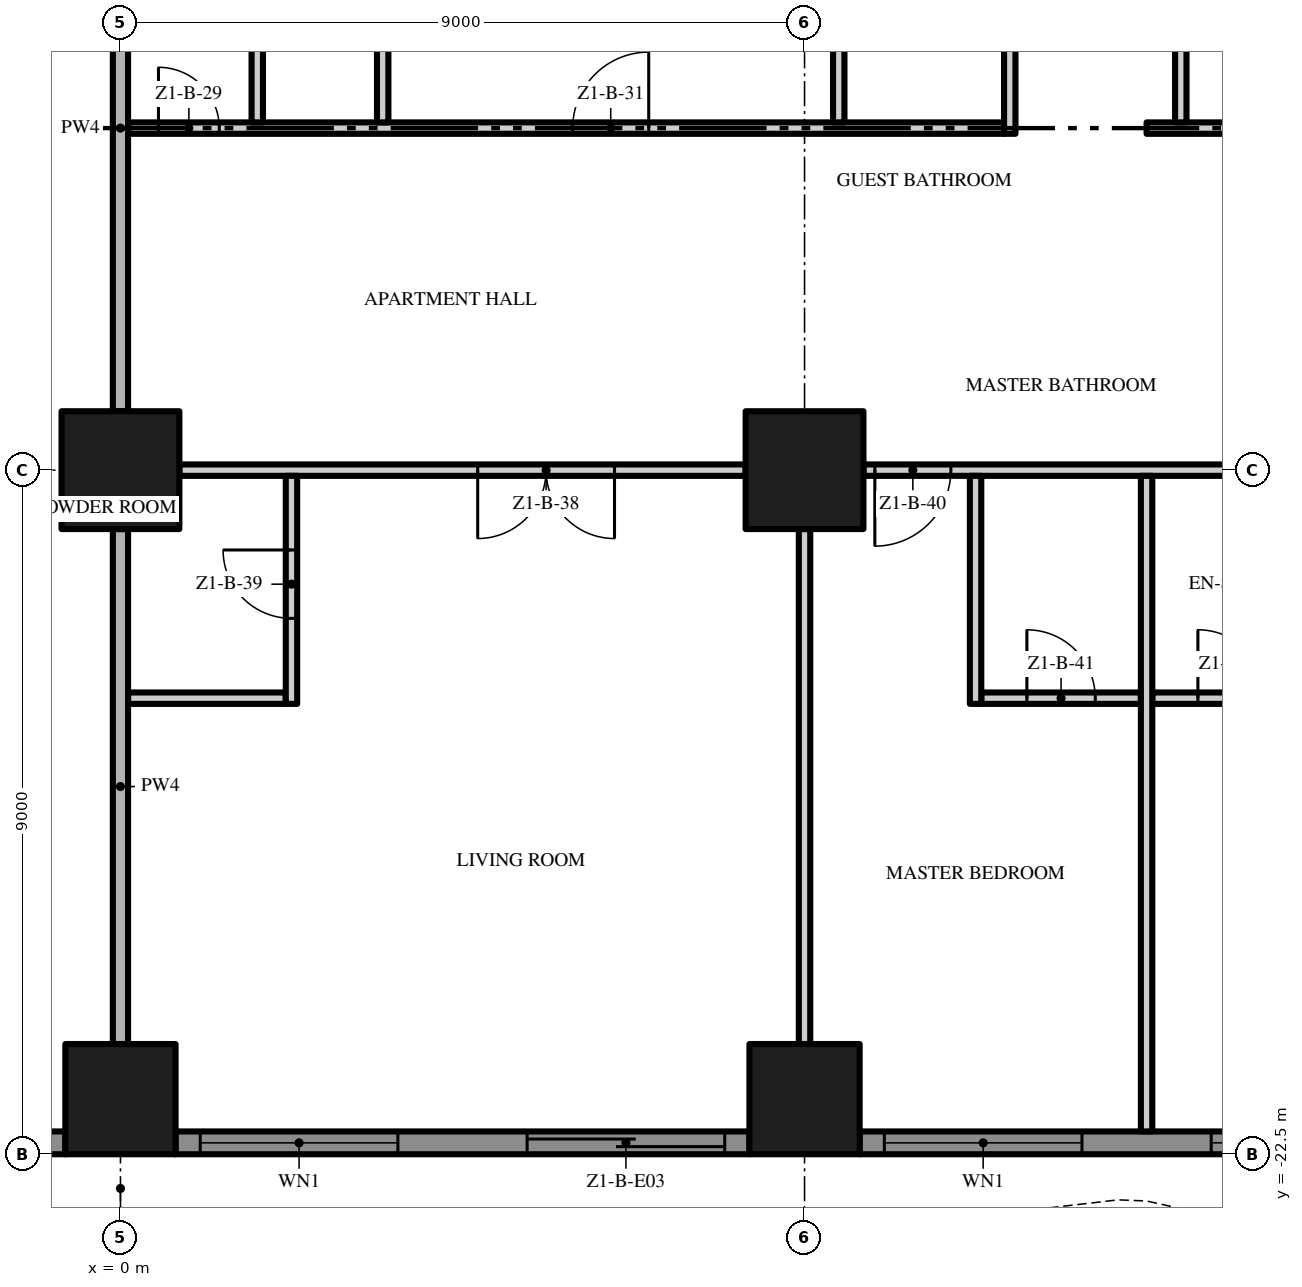
"""IFC4 building model, lengths in metres.
Left out: names, types, materials, properties, quantities, classifications, styles, units other than length and angle.
Written with IfcOpenShell. Run it as: python <this file> out.ifc"""

import sys

from ifc_helpers import new_model, si_unit, direction, frame, frame_2d, origin, origin_2d, place, context, subcontext, project, spatial, polyline, rectangle, outline, extrude, element, fill, save


model = new_model("IFC4")
c1 = context("Model", 3, precision=1e-05, world=origin(), true_north=direction((0.0, 1.0)))
c2 = subcontext(c1, "Body", "Model", "MODEL_VIEW")
j1 = project(units=[si_unit("LENGTHUNIT", "METRE"), si_unit("PLANEANGLEUNIT", "RADIAN")], contexts=[c1])
p1 = place(None, origin())
s1 = spatial("IfcSite", under=j1, at=p1, CompositionType="ELEMENT")
p2 = place(p1, origin())
s2 = spatial("IfcBuilding", under=s1, at=p2, CompositionType="ELEMENT")
p3 = place(p2, frame((0.0, 0.0, 26.4)))
s3 = spatial("IfcBuildingStorey", under=s2, at=p3, CompositionType="ELEMENT", Elevation=26.4)
p4 = place(p3, frame((0.0, -13.5, 0.0), z_axis=(0.0, 0.0, 1.0), x_axis=(1.0, 0.0, 0.0)))
e1 = element("IfcColumn", 1, at=p4, inside=s3, PredefinedType="COLUMN", context=c2, shape_type="SweptSolid", body=[
    extrude(rectangle(XDim=1.55, YDim=1.55, at=origin_2d()), origin(), (0.0, 0.0, 1.0), 3.5),
])
p5 = place(p3, frame((0.0, -21.775, 0.0), z_axis=(0.0, 0.0, 1.0), x_axis=(1.0, 0.0, 0.0)))
e2 = element("IfcColumn", 2, at=p5, inside=s3, PredefinedType="COLUMN", context=c2, shape_type="SweptSolid", body=[
    extrude(rectangle(XDim=1.45, YDim=1.45, at=origin_2d()), origin(), (0.0, 0.0, 1.0), 3.5),
])
p6 = place(p3, frame((9.0, -13.5, 0.0), z_axis=(0.0, 0.0, 1.0), x_axis=(1.0, 0.0, 0.0)))
e3 = element("IfcColumn", 3, at=p6, inside=s3, PredefinedType="COLUMN", context=c2, shape_type="SweptSolid", body=[
    extrude(rectangle(XDim=1.55, YDim=1.55, at=origin_2d()), origin(), (0.0, 0.0, 1.0), 3.5),
])
p7 = place(p3, frame((9.0, -21.775, 0.0), z_axis=(0.0, 0.0, 1.0), x_axis=(1.0, 0.0, 0.0)))
e4 = element("IfcColumn", 4, at=p7, inside=s3, PredefinedType="COLUMN", context=c2, shape_type="SweptSolid", body=[
    extrude(rectangle(XDim=1.45, YDim=1.45, at=origin_2d()), origin(), (0.0, 0.0, 1.0), 3.5),
])
p8 = place(p3, frame((-0.725, -22.35, 0.0), z_axis=(0.0, 0.0, 1.0), x_axis=(-1.0, 0.0, 0.0)))
e5 = element("IfcWall", 5, at=p8, inside=s3, PredefinedType="SOLIDWALL", context=c2, shape_type="SweptSolid", body=[
    extrude(rectangle(XDim=7.55, YDim=0.3, at=frame_2d((3.775, 0.0))), origin(), (0.0, 0.0, 1.0), 3.5),
])
p9 = place(p8, frame((4.625, 0.0, 0.0)))
e6 = element("IfcOpeningElement", 6, at=p9, cuts=e5, PredefinedType="OPENING", context=c2, shape_type="SweptSolid", body=[
    extrude(rectangle(XDim=2.6, YDim=2.4, at=frame_2d((1.3, 1.2))), frame((0.0, 0.16, 0.0), z_axis=(0.0, -1.0, 0.0), x_axis=(1.0, 0.0, 0.0)), (0.0, 0.0, 1.0), 0.32),
])
p10 = place(p8, frame((0.325, 0.0, 0.45)))
e7 = element("IfcOpeningElement", 7, at=p10, cuts=e5, PredefinedType="OPENING", context=c2, shape_type="SweptSolid", body=[
    extrude(rectangle(XDim=2.6, YDim=2.65, at=frame_2d((1.3, 1.325))), frame((0.0, 0.16, 0.0), z_axis=(0.0, -1.0, 0.0), x_axis=(1.0, 0.0, 0.0)), (0.0, 0.0, 1.0), 0.32),
])
p11 = place(p3, frame((8.275, -22.35, 0.0), z_axis=(0.0, 0.0, 1.0), x_axis=(-1.0, 0.0, 0.0)))
e8 = element("IfcWall", 8, at=p11, inside=s3, PredefinedType="SOLIDWALL", context=c2, shape_type="SweptSolid", body=[
    extrude(rectangle(XDim=7.55, YDim=0.3, at=frame_2d((3.775, 0.0))), origin(), (0.0, 0.0, 1.0), 3.5),
])
p12 = place(p11, frame((4.625, 0.0, 0.45)))
e9 = element("IfcOpeningElement", 9, at=p12, cuts=e8, PredefinedType="OPENING", context=c2, shape_type="SweptSolid", body=[
    extrude(rectangle(XDim=2.6, YDim=2.65, at=frame_2d((1.3, 1.325))), frame((0.0, 0.16, 0.0), z_axis=(0.0, -1.0, 0.0), x_axis=(1.0, 0.0, 0.0)), (0.0, 0.0, 1.0), 0.32),
])
p13 = place(p11, frame((0.325, 0.0, 0.0)))
e10 = element("IfcOpeningElement", 10, at=p13, cuts=e8, PredefinedType="OPENING", context=c2, shape_type="SweptSolid", body=[
    extrude(rectangle(XDim=2.6, YDim=2.4, at=frame_2d((1.3, 1.2))), frame((0.0, 0.16, 0.0), z_axis=(0.0, -1.0, 0.0), x_axis=(1.0, 0.0, 0.0)), (0.0, 0.0, 1.0), 0.32),
])
p14 = place(p3, frame((17.275, -22.35, 0.0), z_axis=(0.0, 0.0, 1.0), x_axis=(-1.0, 0.0, 0.0)))
e11 = element("IfcWall", 11, at=p14, inside=s3, PredefinedType="SOLIDWALL", context=c2, shape_type="SweptSolid", body=[
    extrude(rectangle(XDim=7.55, YDim=0.3, at=frame_2d((3.775, 0.0))), origin(), (0.0, 0.0, 1.0), 3.5),
])
p15 = place(p14, frame((4.625, 0.0, 0.45)))
e12 = element("IfcOpeningElement", 12, at=p15, cuts=e11, PredefinedType="OPENING", context=c2, shape_type="SweptSolid", body=[
    extrude(rectangle(XDim=2.6, YDim=2.65, at=frame_2d((1.3, 1.325))), frame((0.0, 0.16, 0.0), z_axis=(0.0, -1.0, 0.0), x_axis=(1.0, 0.0, 0.0)), (0.0, 0.0, 1.0), 0.32),
])
p16 = place(p14, frame((0.325, 0.0, 0.45)))
e13 = element("IfcOpeningElement", 13, at=p16, cuts=e11, PredefinedType="OPENING", context=c2, shape_type="SweptSolid", body=[
    extrude(rectangle(XDim=2.6, YDim=2.65, at=frame_2d((1.3, 1.325))), frame((0.0, 0.16, 0.0), z_axis=(0.0, -1.0, 0.0), x_axis=(1.0, 0.0, 0.0)), (0.0, 0.0, 1.0), 0.32),
])
p17 = place(p3, origin())
e14 = element("IfcWall", 14, at=p17, inside=s3, PredefinedType="USERDEFINED", context=c2, shape_type="SweptSolid", body=[
    extrude(outline(polyline([(-22.5, -25.149), (-21.0, -24.488), (-19.5, -23.755), (-18.0, -23.231), (-16.875, -23.1), (-16.5, -23.115), (-15.0, -23.451), (-13.5, -24.112), (-12.0, -24.845), (-10.5, -25.369), (-9.375, -25.5), (-9.0, -25.485), (-7.5, -25.149), (-6.0, -24.488), (-4.5, -23.755), (-3.0, -23.231), (-1.875, -23.1), (-1.5, -23.115), (0.0, -23.451), (1.5, -24.112), (3.0, -24.845), (4.5, -25.369), (5.625, -25.5), (6.0, -25.485), (7.5, -25.149), (9.0, -24.488), (10.5, -23.755), (12.0, -23.231), (13.125, -23.1), (13.5, -23.115), (15.0, -23.451), (16.5, -24.112), (18.0, -24.845), (19.5, -25.369), (20.625, -25.5), (21.0, -25.485), (22.5, -25.149), (22.445, -24.905), (20.967, -25.236), (20.635, -25.249), (19.556, -25.124), (18.096, -24.614), (16.605, -23.885), (15.079, -23.213), (13.533, -22.866), (13.115, -22.849), (11.944, -22.986), (10.404, -23.524), (8.895, -24.261), (7.421, -24.91), (5.967, -25.236), (5.635, -25.249), (4.556, -25.124), (3.096, -24.614), (1.605, -23.885), (0.079, -23.213), (-1.467, -22.866), (-1.885, -22.849), (-3.056, -22.986), (-4.596, -23.524), (-6.105, -24.261), (-7.579, -24.91), (-9.033, -25.236), (-9.365, -25.249), (-10.444, -25.124), (-11.904, -24.614), (-13.395, -23.885), (-14.921, -23.213), (-16.467, -22.866), (-16.885, -22.849), (-18.056, -22.986), (-19.596, -23.524), (-21.105, -24.261), (-22.601, -24.92), (-22.5, -25.149)])), origin(), (0.0, 0.0, 1.0), 0.9),
])
p18 = place(p3, frame((0.1, -16.5, 0.0), z_axis=(0.0, 0.0, 1.0), x_axis=(1.0, 0.0, 0.0)))
e15 = element("IfcWall", 15, at=p18, inside=s3, PredefinedType="PARTITIONING", context=c2, shape_type="SweptSolid", body=[
    extrude(rectangle(XDim=2.075, YDim=0.15, at=frame_2d((1.038, 0.0))), origin(), (0.0, 0.0, 1.0), 3.5),
])
p19 = place(p3, frame((11.325, -16.5, 0.0), z_axis=(0.0, 0.0, 1.0), x_axis=(1.0, 0.0, 0.0)))
e16 = element("IfcWall", 16, at=p19, inside=s3, PredefinedType="PARTITIONING", context=c2, shape_type="SweptSolid", body=[
    extrude(rectangle(XDim=2.1, YDim=0.15, at=frame_2d((1.05, 0.0))), origin(), (0.0, 0.0, 1.0), 3.5),
])
p20 = place(p19, frame((0.6, 0.0, 0.0)))
e17 = element("IfcOpeningElement", 17, at=p20, cuts=e16, PredefinedType="OPENING", context=c2, shape_type="SweptSolid", body=[
    extrude(rectangle(XDim=0.9, YDim=2.1, at=frame_2d((0.45, 1.05))), frame((0.0, 0.085, 0.0), z_axis=(0.0, -1.0, 0.0), x_axis=(1.0, 0.0, 0.0)), (0.0, 0.0, 1.0), 0.17),
])
p21 = place(p3, frame((13.575, -16.5, 0.0), z_axis=(0.0, 0.0, 1.0), x_axis=(1.0, 0.0, 0.0)))
e18 = element("IfcWall", 18, at=p21, inside=s3, PredefinedType="PARTITIONING", context=c2, shape_type="SweptSolid", body=[
    extrude(rectangle(XDim=2.1, YDim=0.15, at=frame_2d((1.05, 0.0))), origin(), (0.0, 0.0, 1.0), 3.5),
])
p22 = place(p21, frame((0.6, 0.0, 0.0)))
e19 = element("IfcOpeningElement", 19, at=p22, cuts=e18, PredefinedType="OPENING", context=c2, shape_type="SweptSolid", body=[
    extrude(rectangle(XDim=0.9, YDim=2.1, at=frame_2d((0.45, 1.05))), frame((0.0, 0.085, 0.0), z_axis=(0.0, -1.0, 0.0), x_axis=(1.0, 0.0, 0.0)), (0.0, 0.0, 1.0), 0.17),
])
p23 = place(p3, frame((8.225, -13.5, 0.0), z_axis=(0.0, 0.0, 1.0), x_axis=(-1.0, 0.0, 0.0)))
e20 = element("IfcWall", 20, at=p23, inside=s3, PredefinedType="PARTITIONING", context=c2, shape_type="SweptSolid", body=[
    extrude(rectangle(XDim=7.45, YDim=0.15, at=frame_2d((3.725, 0.0))), origin(), (0.0, 0.0, 1.0), 3.5),
])
p24 = place(p23, frame((1.725, 0.0, 0.0)))
e21 = element("IfcOpeningElement", 21, at=p24, cuts=e20, PredefinedType="OPENING", context=c2, shape_type="SweptSolid", body=[
    extrude(rectangle(XDim=1.8, YDim=2.4, at=frame_2d((0.9, 1.2))), frame((0.0, 0.085, 0.0), z_axis=(0.0, -1.0, 0.0), x_axis=(1.0, 0.0, 0.0)), (0.0, 0.0, 1.0), 0.17),
])
p25 = place(p3, frame((17.225, -13.5, 0.0), z_axis=(0.0, 0.0, 1.0), x_axis=(-1.0, 0.0, 0.0)))
e22 = element("IfcWall", 22, at=p25, inside=s3, PredefinedType="PARTITIONING", context=c2, shape_type="SweptSolid", body=[
    extrude(rectangle(XDim=7.45, YDim=0.15, at=frame_2d((3.725, 0.0))), origin(), (0.0, 0.0, 1.0), 3.5),
])
p26 = place(p25, frame((6.3, 0.0, 0.0)))
e23 = element("IfcOpeningElement", 23, at=p26, cuts=e22, PredefinedType="OPENING", context=c2, shape_type="SweptSolid", body=[
    extrude(rectangle(XDim=1.0, YDim=2.4, at=frame_2d((0.5, 1.2))), frame((0.0, 0.085, 0.0), z_axis=(0.0, -1.0, 0.0), x_axis=(1.0, 0.0, 0.0)), (0.0, 0.0, 1.0), 0.17),
])
p27 = place(p25, frame((0.15, 0.0, 0.0)))
e24 = element("IfcOpeningElement", 24, at=p27, cuts=e22, PredefinedType="OPENING", context=c2, shape_type="SweptSolid", body=[
    extrude(rectangle(XDim=1.0, YDim=2.4, at=frame_2d((0.5, 1.2))), frame((0.0, 0.085, 0.0), z_axis=(0.0, -1.0, 0.0), x_axis=(1.0, 0.0, 0.0)), (0.0, 0.0, 1.0), 0.17),
])
p28 = place(p3, frame((0.1, -9.0, 0.0), z_axis=(0.0, 0.0, 1.0), x_axis=(1.0, 0.0, 0.0)))
e25 = element("IfcWall", 25, at=p28, inside=s3, PredefinedType="PARTITIONING", context=c2, shape_type="SweptSolid", body=[
    extrude(rectangle(XDim=11.525, YDim=0.15, at=frame_2d((5.763, 0.0))), origin(), (0.0, 0.0, 1.0), 3.5),
])
p29 = place(p28, frame((0.4, 0.0, 0.0)))
e26 = element("IfcOpeningElement", 26, at=p29, cuts=e25, PredefinedType="OPENING", context=c2, shape_type="SweptSolid", body=[
    extrude(rectangle(XDim=0.8, YDim=2.0, at=frame_2d((0.4, 1.0))), frame((0.0, 0.085, 0.0), z_axis=(0.0, -1.0, 0.0), x_axis=(1.0, 0.0, 0.0)), (0.0, 0.0, 1.0), 0.17),
])
p30 = place(p28, frame((5.85, 0.0, 0.0)))
e27 = element("IfcOpeningElement", 27, at=p30, cuts=e25, PredefinedType="OPENING", context=c2, shape_type="SweptSolid", body=[
    extrude(rectangle(XDim=1.0, YDim=2.4, at=frame_2d((0.5, 1.2))), frame((0.0, 0.085, 0.0), z_axis=(0.0, -1.0, 0.0), x_axis=(1.0, 0.0, 0.0)), (0.0, 0.0, 1.0), 0.17),
])
p31 = place(p3, frame((13.5, -9.0, 0.0), z_axis=(0.0, 0.0, 1.0), x_axis=(1.0, 0.0, 0.0)))
e28 = element("IfcWall", 28, at=p31, inside=s3, PredefinedType="PARTITIONING", context=c2, shape_type="SweptSolid", body=[
    extrude(rectangle(XDim=13.2, YDim=0.15, at=frame_2d((6.6, 0.0))), origin(), (0.0, 0.0, 1.0), 3.5),
])
p32 = place(p31, frame((4.0, 0.0, 0.0)))
e29 = element("IfcOpeningElement", 29, at=p32, cuts=e28, PredefinedType="OPENING", context=c2, shape_type="SweptSolid", body=[
    extrude(rectangle(XDim=0.8, YDim=2.0, at=frame_2d((0.4, 1.0))), frame((0.0, 0.085, 0.0), z_axis=(0.0, -1.0, 0.0), x_axis=(1.0, 0.0, 0.0)), (0.0, 0.0, 1.0), 0.17),
])
p33 = place(p31, frame((12.2, 0.0, 0.0)))
e30 = element("IfcOpeningElement", 30, at=p33, cuts=e28, PredefinedType="OPENING", context=c2, shape_type="SweptSolid", body=[
    extrude(rectangle(XDim=0.8, YDim=2.0, at=frame_2d((0.4, 1.0))), frame((0.0, 0.085, 0.0), z_axis=(0.0, -1.0, 0.0), x_axis=(1.0, 0.0, 0.0)), (0.0, 0.0, 1.0), 0.17),
])
p34 = place(p3, frame((0.0, -21.05, 0.0), z_axis=(0.0, 0.0, 1.0), x_axis=(0.0, 1.0, 0.0)))
e31 = element("IfcWall", 31, at=p34, inside=s3, PredefinedType="PARTITIONING", context=c2, shape_type="SweptSolid", body=[
    extrude(rectangle(XDim=6.775, YDim=0.2, at=frame_2d((3.388, 0.0))), origin(), (0.0, 0.0, 1.0), 3.5),
])
p35 = place(p3, frame((0.0, -12.725, 0.0), z_axis=(0.0, 0.0, 1.0), x_axis=(0.0, 1.0, 0.0)))
e32 = element("IfcWall", 32, at=p35, inside=s3, PredefinedType="PARTITIONING", context=c2, shape_type="SweptSolid", body=[
    extrude(rectangle(XDim=7.45, YDim=0.2, at=frame_2d((3.725, 0.0))), origin(), (0.0, 0.0, 1.0), 3.5),
])
p36 = place(p3, frame((1.8, -8.925, 0.0), z_axis=(0.0, 0.0, 1.0), x_axis=(0.0, 1.0, 0.0)))
e33 = element("IfcWall", 33, at=p36, inside=s3, PredefinedType="PARTITIONING", context=c2, shape_type="SweptSolid", body=[
    extrude(rectangle(XDim=4.35, YDim=0.15, at=frame_2d((2.175, 0.0))), origin(), (0.0, 0.0, 1.0), 3.5),
])
p37 = place(p3, frame((2.25, -16.575, 0.0), z_axis=(0.0, 0.0, 1.0), x_axis=(0.0, 1.0, 0.0)))
e34 = element("IfcWall", 34, at=p37, inside=s3, PredefinedType="PARTITIONING", context=c2, shape_type="SweptSolid", body=[
    extrude(rectangle(XDim=3.0, YDim=0.15, at=frame_2d((1.5, 0.0))), origin(), (0.0, 0.0, 1.0), 3.5),
])
p38 = place(p37, frame((1.125, 0.0, 0.0)))
e35 = element("IfcOpeningElement", 35, at=p38, cuts=e34, PredefinedType="OPENING", context=c2, shape_type="SweptSolid", body=[
    extrude(rectangle(XDim=0.9, YDim=2.1, at=frame_2d((0.45, 1.05))), frame((0.0, 0.085, 0.0), z_axis=(0.0, -1.0, 0.0), x_axis=(1.0, 0.0, 0.0)), (0.0, 0.0, 1.0), 0.17),
])
p39 = place(p3, frame((3.45, -8.925, 0.0), z_axis=(0.0, 0.0, 1.0), x_axis=(0.0, 1.0, 0.0)))
e36 = element("IfcWall", 36, at=p39, inside=s3, PredefinedType="PARTITIONING", context=c2, shape_type="SweptSolid", body=[
    extrude(rectangle(XDim=4.35, YDim=0.15, at=frame_2d((2.175, 0.0))), origin(), (0.0, 0.0, 1.0), 3.5),
])
p40 = place(p3, frame((9.0, -21.05, 0.0), z_axis=(0.0, 0.0, 1.0), x_axis=(0.0, 1.0, 0.0)))
e37 = element("IfcWall", 37, at=p40, inside=s3, PredefinedType="PARTITIONING", context=c2, shape_type="SweptSolid", body=[
    extrude(rectangle(XDim=6.775, YDim=0.15, at=frame_2d((3.388, 0.0))), origin(), (0.0, 0.0, 1.0), 3.5),
])
p41 = place(p3, frame((9.45, -8.925, 0.0), z_axis=(0.0, 0.0, 1.0), x_axis=(0.0, 1.0, 0.0)))
e38 = element("IfcWall", 38, at=p41, inside=s3, PredefinedType="PARTITIONING", context=c2, shape_type="SweptSolid", body=[
    extrude(rectangle(XDim=3.65, YDim=0.15, at=frame_2d((1.825, 0.0))), origin(), (0.0, 0.0, 1.0), 3.5),
])
p42 = place(p3, frame((11.25, -16.575, 0.0), z_axis=(0.0, 0.0, 1.0), x_axis=(0.0, 1.0, 0.0)))
e39 = element("IfcWall", 39, at=p42, inside=s3, PredefinedType="PARTITIONING", context=c2, shape_type="SweptSolid", body=[
    extrude(rectangle(XDim=3.0, YDim=0.15, at=frame_2d((1.5, 0.0))), origin(), (0.0, 0.0, 1.0), 3.5),
])
p43 = place(p3, frame((11.7, -9.075, 0.0), z_axis=(0.0, 0.0, 1.0), x_axis=(0.0, 1.0, 0.0)))
e40 = element("IfcWall", 40, at=p43, inside=s3, PredefinedType="PARTITIONING", context=c2, shape_type="SweptSolid", body=[
    extrude(rectangle(XDim=4.65, YDim=0.15, at=frame_2d((2.325, 0.0))), origin(), (0.0, 0.0, 1.0), 3.5),
])
p44 = place(p43, frame((1.875, 0.0, 0.0)))
e41 = element("IfcOpeningElement", 41, at=p44, cuts=e40, PredefinedType="OPENING", context=c2, shape_type="SweptSolid", body=[
    extrude(rectangle(XDim=0.9, YDim=2.1, at=frame_2d((0.45, 1.05))), frame((0.0, 0.085, 0.0), z_axis=(0.0, -1.0, 0.0), x_axis=(1.0, 0.0, 0.0)), (0.0, 0.0, 1.0), 0.17),
])
p45 = place(p3, frame((13.5, -22.2, 0.0), z_axis=(0.0, 0.0, 1.0), x_axis=(0.0, 1.0, 0.0)))
e42 = element("IfcWall", 42, at=p45, inside=s3, PredefinedType="PARTITIONING", context=c2, shape_type="SweptSolid", body=[
    extrude(rectangle(XDim=8.625, YDim=0.15, at=frame_2d((4.312, 0.0))), origin(), (0.0, 0.0, 1.0), 3.5),
])
p46 = place(p3, frame((13.95, -8.925, 0.0), z_axis=(0.0, 0.0, 1.0), x_axis=(0.0, 1.0, 0.0)))
e43 = element("IfcWall", 43, at=p46, inside=s3, PredefinedType="PARTITIONING", context=c2, shape_type="SweptSolid", body=[
    extrude(rectangle(XDim=4.5, YDim=0.15, at=frame_2d((2.25, 0.0))), origin(), (0.0, 0.0, 1.0), 3.5),
])
p47 = place(p12, origin())
e44 = element("IfcWindow", 44, at=p47, inside=s3, PartitioningType="SINGLE_PANEL", PredefinedType="WINDOW", context=c2, shape_type="SweptSolid", body=[
    extrude(rectangle(XDim=2.6, YDim=2.65, at=frame_2d((1.3, 1.325))), frame((0.0, 0.03, 0.0), z_axis=(0.0, -1.0, 0.0), x_axis=(1.0, 0.0, 0.0)), (0.0, 0.0, 1.0), 0.06),
])
fill(e9, e44)
p48 = place(p13, origin())
e45 = element("IfcDoor", 45, at=p48, inside=s3, OperationType="SINGLE_SWING_LEFT", PredefinedType="DOOR", context=c2, shape_type="SweptSolid", body=[
    extrude(rectangle(XDim=2.6, YDim=2.4, at=frame_2d((1.3, 1.2))), frame((0.0, 0.025, 0.0), z_axis=(0.0, -1.0, 0.0), x_axis=(1.0, 0.0, 0.0)), (0.0, 0.0, 1.0), 0.05),
])
fill(e10, e45)
p49 = place(p15, origin())
e46 = element("IfcWindow", 46, at=p49, inside=s3, PartitioningType="SINGLE_PANEL", PredefinedType="WINDOW", context=c2, shape_type="SweptSolid", body=[
    extrude(rectangle(XDim=2.6, YDim=2.65, at=frame_2d((1.3, 1.325))), frame((0.0, 0.03, 0.0), z_axis=(0.0, -1.0, 0.0), x_axis=(1.0, 0.0, 0.0)), (0.0, 0.0, 1.0), 0.06),
])
fill(e12, e46)
p50 = place(p16, origin())
e47 = element("IfcWindow", 47, at=p50, inside=s3, PartitioningType="SINGLE_PANEL", PredefinedType="WINDOW", context=c2, shape_type="SweptSolid", body=[
    extrude(rectangle(XDim=2.6, YDim=2.65, at=frame_2d((1.3, 1.325))), frame((0.0, 0.03, 0.0), z_axis=(0.0, -1.0, 0.0), x_axis=(1.0, 0.0, 0.0)), (0.0, 0.0, 1.0), 0.06),
])
fill(e13, e47)
p51 = place(p29, origin())
e48 = element("IfcDoor", 48, at=p51, inside=s3, OperationType="SINGLE_SWING_LEFT", PredefinedType="DOOR", context=c2, shape_type="SweptSolid", body=[
    extrude(rectangle(XDim=0.8, YDim=2.0, at=frame_2d((0.4, 1.0))), frame((0.0, 0.025, 0.0), z_axis=(0.0, -1.0, 0.0), x_axis=(1.0, 0.0, 0.0)), (0.0, 0.0, 1.0), 0.05),
])
fill(e26, e48)
p52 = place(p30, origin())
e49 = element("IfcDoor", 49, at=p52, inside=s3, OperationType="SINGLE_SWING_RIGHT", PredefinedType="DOOR", context=c2, shape_type="SweptSolid", body=[
    extrude(rectangle(XDim=1.0, YDim=2.4, at=frame_2d((0.5, 1.2))), frame((0.0, 0.025, 0.0), z_axis=(0.0, -1.0, 0.0), x_axis=(1.0, 0.0, 0.0)), (0.0, 0.0, 1.0), 0.05),
])
fill(e27, e49)
p53 = place(p24, origin())
e50 = element("IfcDoor", 50, at=p53, inside=s3, OperationType="DOUBLE_DOOR_SINGLE_SWING", PredefinedType="DOOR", context=c2, shape_type="SweptSolid", body=[
    extrude(rectangle(XDim=1.8, YDim=2.4, at=frame_2d((0.9, 1.2))), frame((0.0, 0.025, 0.0), z_axis=(0.0, -1.0, 0.0), x_axis=(1.0, 0.0, 0.0)), (0.0, 0.0, 1.0), 0.05),
])
fill(e21, e50)
p54 = place(p38, origin())
e51 = element("IfcDoor", 51, at=p54, inside=s3, OperationType="SINGLE_SWING_RIGHT", PredefinedType="DOOR", context=c2, shape_type="SweptSolid", body=[
    extrude(rectangle(XDim=0.9, YDim=2.1, at=frame_2d((0.45, 1.05))), frame((0.0, 0.025, 0.0), z_axis=(0.0, -1.0, 0.0), x_axis=(1.0, 0.0, 0.0)), (0.0, 0.0, 1.0), 0.05),
])
fill(e35, e51)
p55 = place(p26, origin())
e52 = element("IfcDoor", 52, at=p55, inside=s3, OperationType="SINGLE_SWING_RIGHT", PredefinedType="DOOR", context=c2, shape_type="SweptSolid", body=[
    extrude(rectangle(XDim=1.0, YDim=2.4, at=frame_2d((0.5, 1.2))), frame((0.0, 0.025, 0.0), z_axis=(0.0, -1.0, 0.0), x_axis=(1.0, 0.0, 0.0)), (0.0, 0.0, 1.0), 0.05),
])
fill(e23, e52)
p56 = place(p20, origin())
e53 = element("IfcDoor", 53, at=p56, inside=s3, OperationType="SINGLE_SWING_LEFT", PredefinedType="DOOR", context=c2, shape_type="SweptSolid", body=[
    extrude(rectangle(XDim=0.9, YDim=2.1, at=frame_2d((0.45, 1.05))), frame((0.0, 0.025, 0.0), z_axis=(0.0, -1.0, 0.0), x_axis=(1.0, 0.0, 0.0)), (0.0, 0.0, 1.0), 0.05),
])
fill(e17, e53)
p57 = place(p22, origin())
e54 = element("IfcDoor", 54, at=p57, inside=s3, OperationType="SINGLE_SWING_LEFT", PredefinedType="DOOR", context=c2, shape_type="SweptSolid", body=[
    extrude(rectangle(XDim=0.9, YDim=2.1, at=frame_2d((0.45, 1.05))), frame((0.0, 0.025, 0.0), z_axis=(0.0, -1.0, 0.0), x_axis=(1.0, 0.0, 0.0)), (0.0, 0.0, 1.0), 0.05),
])
fill(e19, e54)
save(model, sys.argv[1])
